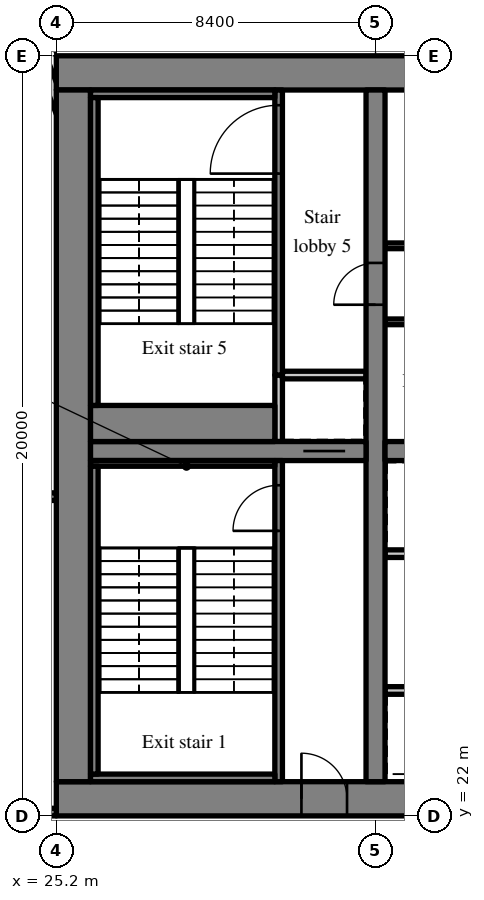
"""IFC4 building model, lengths in metres.
Left out: names, types, materials, properties, quantities, classifications, styles, units other than length and angle.
Written with IfcOpenShell. Run it as: python <this file> out.ifc"""

import sys

from ifc_helpers import new_model, si_unit, direction, frame, frame_2d, origin, place, context, subcontext, project, spatial, rectangle, extrude, source, transform, mapped, element, fill, save


model = new_model("IFC4")
c1 = context("Model", 3, precision=1e-05, world=origin(), true_north=direction((0.0, 1.0)))
c2 = subcontext(c1, "Body", "Model", "MODEL_VIEW")
j1 = project(units=[si_unit("LENGTHUNIT", "METRE"), si_unit("PLANEANGLEUNIT", "RADIAN")], contexts=[c1])
p1 = place(None, origin())
s1 = spatial("IfcSite", under=j1, at=p1, CompositionType="ELEMENT")
p2 = place(p1, origin())
s2 = spatial("IfcBuilding", under=s1, at=p2, CompositionType="ELEMENT")
p3 = place(p2, frame((0.0, 0.0, 86.4)))
s3 = spatial("IfcBuildingStorey", under=s2, at=p3, CompositionType="ELEMENT", Elevation=86.4)
m1 = source(origin(), c2, "Body", "SweptSolid", [
    extrude(rectangle(XDim=50.4, YDim=0.9, at=frame_2d((25.2, 0.0))), origin(), (0.0, 0.0, 1.0), 4.72),
])
p4 = place(p3, frame((25.2, 22.45, 0.0), z_axis=(0.0, 0.0, 1.0), x_axis=(1.0, 0.0, 0.0)))
e1 = element("IfcWall", 1, at=p4, inside=s3, PredefinedType="SHEAR", context=c2, shape_type="MappedRepresentation", body=[
    mapped(m1, transform((0.0, 0.0, 0.0), scale=1.0)),
])
m2 = source(origin(), c2, "Body", "SweptSolid", [
    extrude(rectangle(XDim=1.8, YDim=2.1, at=frame_2d((0.9, 1.05))), frame((0.0, 0.46, 0.0), z_axis=(0.0, -1.0, 0.0), x_axis=(1.0, 0.0, 0.0)), (0.0, 0.0, 1.0), 0.92),
])
p5 = place(p4, frame((15.9, 0.0, 0.0)))
e2 = element("IfcOpeningElement", 2, at=p5, cuts=e1, PredefinedType="OPENING", context=c2, shape_type="MappedRepresentation", body=[
    mapped(m2, transform((0.0, 0.0, 0.0), scale=1.0)),
])
m3 = source(origin(), c2, "Body", "SweptSolid", [
    extrude(rectangle(XDim=1.2, YDim=2.1, at=frame_2d((0.6, 1.05))), frame((0.0, 0.46, 0.0), z_axis=(0.0, -1.0, 0.0), x_axis=(1.0, 0.0, 0.0)), (0.0, 0.0, 1.0), 0.92),
])
p6 = place(p4, frame((26.975, 0.0, 0.0)))
e3 = element("IfcOpeningElement", 3, at=p6, cuts=e1, PredefinedType="OPENING", context=c2, shape_type="MappedRepresentation", body=[
    mapped(m3, transform((0.0, 0.0, 0.0), scale=1.0)),
])
m4 = source(origin(), c2, "Body", "SweptSolid", [
    extrude(rectangle(XDim=0.9, YDim=2.1, at=frame_2d((0.45, 1.05))), frame((0.0, 0.46, 0.0), z_axis=(0.0, -1.0, 0.0), x_axis=(1.0, 0.0, 0.0)), (0.0, 0.0, 1.0), 0.92),
])
p7 = place(p4, frame((34.5, 0.0, 0.0)))
e4 = element("IfcOpeningElement", 4, at=p7, cuts=e1, PredefinedType="OPENING", context=c2, shape_type="MappedRepresentation", body=[
    mapped(m4, transform((0.0, 0.0, 0.0), scale=1.0)),
])
p8 = place(p4, frame((31.5, 0.0, 0.0)))
e5 = element("IfcOpeningElement", 5, at=p8, cuts=e1, PredefinedType="OPENING", context=c2, shape_type="MappedRepresentation", body=[
    mapped(m4, transform((0.0, 0.0, 0.0), scale=1.0)),
])
p9 = place(p4, frame((39.788, 0.0, 0.0)))
e6 = element("IfcOpeningElement", 6, at=p9, cuts=e1, PredefinedType="OPENING", context=c2, shape_type="MappedRepresentation", body=[
    mapped(m4, transform((0.0, 0.0, 0.0), scale=1.0)),
])
p10 = place(p4, frame((36.762, 0.0, 0.0)))
e7 = element("IfcOpeningElement", 7, at=p10, cuts=e1, PredefinedType="OPENING", context=c2, shape_type="MappedRepresentation", body=[
    mapped(m4, transform((0.0, 0.0, 0.0), scale=1.0)),
])
p11 = place(p4, frame((6.45, 0.0, 0.0)))
e8 = element("IfcOpeningElement", 8, at=p11, cuts=e1, PredefinedType="OPENING", context=c2, shape_type="MappedRepresentation", body=[
    mapped(m3, transform((0.0, 0.0, 0.0), scale=1.0)),
])
p12 = place(p4, frame((47.775, 0.0, 0.0)))
e9 = element("IfcOpeningElement", 9, at=p12, cuts=e1, PredefinedType="OPENING", context=c2, shape_type="MappedRepresentation", body=[
    mapped(m3, transform((0.0, 0.0, 0.0), scale=1.0)),
])
p13 = place(p3, frame((25.2, 41.55, 0.0), z_axis=(0.0, 0.0, 1.0), x_axis=(1.0, 0.0, 0.0)))
e10 = element("IfcWall", 10, at=p13, inside=s3, PredefinedType="SHEAR", context=c2, shape_type="MappedRepresentation", body=[
    mapped(m1, transform((0.0, 0.0, 0.0), scale=1.0)),
])
m5 = source(origin(), c2, "Body", "SweptSolid", [
    extrude(rectangle(XDim=18.2, YDim=0.9, at=frame_2d((9.1, 0.0))), origin(), (0.0, 0.0, 1.0), 4.72),
])
p14 = place(p3, frame((25.65, 22.9, 0.0), z_axis=(0.0, 0.0, 1.0), x_axis=(0.0, 1.0, 0.0)))
e11 = element("IfcWall", 11, at=p14, inside=s3, PredefinedType="SHEAR", context=c2, shape_type="MappedRepresentation", body=[
    mapped(m5, transform((0.0, 0.0, 0.0), scale=1.0)),
])
m6 = source(origin(), c2, "Body", "SweptSolid", [
    extrude(rectangle(XDim=18.2, YDim=0.5, at=frame_2d((9.1, 0.0))), origin(), (0.0, 0.0, 1.0), 4.72),
])
p15 = place(p3, frame((33.6, 22.9, 0.0), z_axis=(0.0, 0.0, 1.0), x_axis=(0.0, 1.0, 0.0)))
e12 = element("IfcWall", 12, at=p15, inside=s3, PredefinedType="SHEAR", context=c2, shape_type="MappedRepresentation", body=[
    mapped(m6, transform((0.0, 0.0, 0.0), scale=1.0)),
])
m7 = source(origin(), c2, "Body", "SweptSolid", [
    extrude(rectangle(XDim=1.1, YDim=2.1, at=frame_2d((0.55, 1.05))), frame((0.0, 0.26, 0.0), z_axis=(0.0, -1.0, 0.0), x_axis=(1.0, 0.0, 0.0)), (0.0, 0.0, 1.0), 0.52),
])
p16 = place(p15, frame((12.55, 0.0, 0.0)))
e13 = element("IfcOpeningElement", 13, at=p16, cuts=e12, PredefinedType="OPENING", context=c2, shape_type="MappedRepresentation", body=[
    mapped(m7, transform((0.0, 0.0, 0.0), scale=1.0)),
])
m8 = source(origin(), c2, "Body", "SweptSolid", [
    extrude(rectangle(XDim=7.25, YDim=0.5, at=frame_2d((3.625, 0.0))), origin(), (0.0, 0.0, 1.0), 4.72),
])
p17 = place(p3, frame((26.1, 31.6, 0.0), z_axis=(0.0, 0.0, 1.0), x_axis=(1.0, 0.0, 0.0)))
e14 = element("IfcWall", 14, at=p17, inside=s3, PredefinedType="SHEAR", context=c2, shape_type="MappedRepresentation", body=[
    mapped(m8, transform((0.0, 0.0, 0.0), scale=1.0)),
])
p18 = place(p17, frame((5.6, 0.0, 0.0)))
e15 = element("IfcOpeningElement", 15, at=p18, cuts=e14, PredefinedType="OPENING", context=c2, shape_type="MappedRepresentation", body=[
    mapped(m7, transform((0.0, 0.0, 0.0), scale=1.0)),
])
m9 = source(origin(), c2, "Body", "SweptSolid", [
    extrude(rectangle(XDim=16.3, YDim=0.5, at=frame_2d((8.15, 0.0))), origin(), (0.0, 0.0, 1.0), 4.72),
])
p19 = place(p3, frame((33.85, 31.6, 0.0), z_axis=(0.0, 0.0, 1.0), x_axis=(1.0, 0.0, 0.0)))
e16 = element("IfcWall", 16, at=p19, inside=s3, PredefinedType="SHEAR", context=c2, shape_type="MappedRepresentation", body=[
    mapped(m9, transform((0.0, 0.0, 0.0), scale=1.0)),
])
m10 = source(origin(), c2, "Body", "SweptSolid", [
    extrude(rectangle(XDim=1.0, YDim=2.1, at=frame_2d((0.5, 1.05))), frame((0.0, 0.26, 0.0), z_axis=(0.0, -1.0, 0.0), x_axis=(1.0, 0.0, 0.0)), (0.0, 0.0, 1.0), 0.52),
])
p20 = place(p19, frame((14.725, 0.0, 0.0)))
e17 = element("IfcOpeningElement", 17, at=p20, cuts=e16, PredefinedType="OPENING", context=c2, shape_type="MappedRepresentation", body=[
    mapped(m10, transform((0.0, 0.0, 0.0), scale=1.0)),
])
m11 = source(origin(), c2, "Body", "SweptSolid", [
    extrude(rectangle(XDim=3.559, YDim=0.3, at=frame_2d((1.78, 0.0))), origin(), (0.0, 0.0, 1.0), 4.72),
])
p21 = place(p3, frame((25.55, 39.969, 0.0), z_axis=(0.0, 0.0, 1.0), x_axis=(-0.35779745313, 0.933799219604, 0.0)))
e18 = element("IfcWall", 18, at=p21, inside=s3, PredefinedType="SOLIDWALL", context=c2, shape_type="MappedRepresentation", body=[
    mapped(m11, transform((0.0, 0.0, 0.0), scale=1.0)),
])
m12 = source(origin(), c2, "Body", "SweptSolid", [
    extrude(rectangle(XDim=1.5, YDim=2.0, at=frame_2d((0.75, 1.0))), frame((0.0, 0.16, 0.0), z_axis=(0.0, -1.0, 0.0), x_axis=(1.0, 0.0, 0.0)), (0.0, 0.0, 1.0), 0.32),
])
p22 = place(p21, frame((1.903, 0.0, 0.9)))
e19 = element("IfcOpeningElement", 19, at=p22, cuts=e18, PredefinedType="OPENING", context=c2, shape_type="MappedRepresentation", body=[
    mapped(m12, transform((0.0, 0.0, 0.0), scale=1.0)),
])
m13 = source(origin(), c2, "Body", "SweptSolid", [
    extrude(rectangle(XDim=6.05, YDim=0.2, at=frame_2d((3.025, 0.0))), origin(), (0.0, 0.0, 1.0), 4.72),
])
p23 = place(p3, frame((33.85, 25.3, 0.0), z_axis=(0.0, 0.0, 1.0), x_axis=(1.0, 0.0, 0.0)))
e20 = element("IfcWall", 20, at=p23, inside=s3, PredefinedType="SOLIDWALL", context=c2, shape_type="MappedRepresentation", body=[
    mapped(m13, transform((0.0, 0.0, 0.0), scale=1.0)),
])
m14 = source(origin(), c2, "Body", "SweptSolid", [
    extrude(rectangle(XDim=1.1, YDim=2.1, at=frame_2d((0.55, 1.05))), frame((0.0, 0.11, 0.0), z_axis=(0.0, -1.0, 0.0), x_axis=(1.0, 0.0, 0.0)), (0.0, 0.0, 1.0), 0.22),
])
p24 = place(p23, frame((1.0, 0.0, 0.0)))
e21 = element("IfcOpeningElement", 21, at=p24, cuts=e20, PredefinedType="OPENING", context=c2, shape_type="MappedRepresentation", body=[
    mapped(m14, transform((0.0, 0.0, 0.0), scale=1.0)),
])
p25 = place(p23, frame((4.0, 0.0, 0.0)))
e22 = element("IfcOpeningElement", 22, at=p25, cuts=e20, PredefinedType="OPENING", context=c2, shape_type="MappedRepresentation", body=[
    mapped(m14, transform((0.0, 0.0, 0.0), scale=1.0)),
])
m15 = source(origin(), c2, "Body", "SweptSolid", [
    extrude(rectangle(XDim=12.05, YDim=0.2, at=frame_2d((6.025, 0.0))), origin(), (0.0, 0.0, 1.0), 4.72),
])
p26 = place(p3, frame((33.85, 28.9, 0.0), z_axis=(0.0, 0.0, 1.0), x_axis=(1.0, 0.0, 0.0)))
e23 = element("IfcWall", 23, at=p26, inside=s3, PredefinedType="SOLIDWALL", context=c2, shape_type="MappedRepresentation", body=[
    mapped(m15, transform((0.0, 0.0, 0.0), scale=1.0)),
])
p27 = place(p26, frame((1.0, 0.0, 0.0)))
e24 = element("IfcOpeningElement", 24, at=p27, cuts=e23, PredefinedType="OPENING", context=c2, shape_type="MappedRepresentation", body=[
    mapped(m14, transform((0.0, 0.0, 0.0), scale=1.0)),
])
p28 = place(p26, frame((4.0, 0.0, 0.0)))
e25 = element("IfcOpeningElement", 25, at=p28, cuts=e23, PredefinedType="OPENING", context=c2, shape_type="MappedRepresentation", body=[
    mapped(m14, transform((0.0, 0.0, 0.0), scale=1.0)),
])
p29 = place(p26, frame((7.0, 0.0, 0.0)))
e26 = element("IfcOpeningElement", 26, at=p29, cuts=e23, PredefinedType="OPENING", context=c2, shape_type="MappedRepresentation", body=[
    mapped(m14, transform((0.0, 0.0, 0.0), scale=1.0)),
])
p30 = place(p26, frame((10.0, 0.0, 0.0)))
e27 = element("IfcOpeningElement", 27, at=p30, cuts=e23, PredefinedType="OPENING", context=c2, shape_type="MappedRepresentation", body=[
    mapped(m14, transform((0.0, 0.0, 0.0), scale=1.0)),
])
m16 = source(origin(), c2, "Body", "SweptSolid", [
    extrude(rectangle(XDim=14.15, YDim=0.15, at=frame_2d((7.075, 0.0))), origin(), (0.0, 0.0, 1.0), 4.72),
])
p31 = place(p3, frame((33.85, 35.0, 0.0), z_axis=(0.0, 0.0, 1.0), x_axis=(1.0, 0.0, 0.0)))
e28 = element("IfcWall", 28, at=p31, inside=s3, PredefinedType="PARTITIONING", context=c2, shape_type="MappedRepresentation", body=[
    mapped(m16, transform((0.0, 0.0, 0.0), scale=1.0)),
])
m17 = source(origin(), c2, "Body", "SweptSolid", [
    extrude(rectangle(XDim=0.9, YDim=2.1, at=frame_2d((0.45, 1.05))), frame((0.0, 0.085, 0.0), z_axis=(0.0, -1.0, 0.0), x_axis=(1.0, 0.0, 0.0)), (0.0, 0.0, 1.0), 0.17),
])
p32 = place(p31, frame((2.013, 0.0, 0.0)))
e29 = element("IfcOpeningElement", 29, at=p32, cuts=e28, PredefinedType="OPENING", context=c2, shape_type="MappedRepresentation", body=[
    mapped(m17, transform((0.0, 0.0, 0.0), scale=1.0)),
])
p33 = place(p31, frame((9.051, 0.0, 0.0)))
e30 = element("IfcOpeningElement", 30, at=p33, cuts=e28, PredefinedType="OPENING", context=c2, shape_type="MappedRepresentation", body=[
    mapped(m17, transform((0.0, 0.0, 0.0), scale=1.0)),
])
m18 = source(origin(), c2, "Body", "SweptSolid", [
    extrude(rectangle(XDim=16.3, YDim=0.15, at=frame_2d((8.15, 0.0))), origin(), (0.0, 0.0, 1.0), 4.72),
])
p34 = place(p3, frame((33.85, 37.0, 0.0), z_axis=(0.0, 0.0, 1.0), x_axis=(1.0, 0.0, 0.0)))
e31 = element("IfcWall", 31, at=p34, inside=s3, PredefinedType="PARTITIONING", context=c2, shape_type="MappedRepresentation", body=[
    mapped(m18, transform((0.0, 0.0, 0.0), scale=1.0)),
])
p35 = place(p34, frame((3.217, 0.0, 0.0)))
e32 = element("IfcOpeningElement", 32, at=p35, cuts=e31, PredefinedType="OPENING", context=c2, shape_type="MappedRepresentation", body=[
    mapped(m17, transform((0.0, 0.0, 0.0), scale=1.0)),
])
p36 = place(p34, frame((8.107, 0.0, 0.0)))
e33 = element("IfcOpeningElement", 33, at=p36, cuts=e31, PredefinedType="OPENING", context=c2, shape_type="MappedRepresentation", body=[
    mapped(m17, transform((0.0, 0.0, 0.0), scale=1.0)),
])
p37 = place(p34, frame((11.368, 0.0, 0.0)))
e34 = element("IfcOpeningElement", 34, at=p37, cuts=e31, PredefinedType="OPENING", context=c2, shape_type="MappedRepresentation", body=[
    mapped(m17, transform((0.0, 0.0, 0.0), scale=1.0)),
])
p38 = place(p34, frame((14.627, 0.0, 0.0)))
e35 = element("IfcOpeningElement", 35, at=p38, cuts=e31, PredefinedType="OPENING", context=c2, shape_type="MappedRepresentation", body=[
    mapped(m17, transform((0.0, 0.0, 0.0), scale=1.0)),
])
m19 = source(origin(), c2, "Body", "SweptSolid", [
    extrude(rectangle(XDim=8.45, YDim=0.2, at=frame_2d((4.225, 0.0))), origin(), (0.0, 0.0, 1.0), 4.72),
])
p39 = place(p3, frame((31.05, 22.9, 0.0), z_axis=(0.0, 0.0, 1.0), x_axis=(0.0, 1.0, 0.0)))
e36 = element("IfcWall", 36, at=p39, inside=s3, PredefinedType="SOLIDWALL", context=c2, shape_type="MappedRepresentation", body=[
    mapped(m19, transform((0.0, 0.0, 0.0), scale=1.0)),
])
m20 = source(origin(), c2, "Body", "SweptSolid", [
    extrude(rectangle(XDim=1.2, YDim=2.1, at=frame_2d((0.6, 1.05))), frame((0.0, 0.11, 0.0), z_axis=(0.0, -1.0, 0.0), x_axis=(1.0, 0.0, 0.0)), (0.0, 0.0, 1.0), 0.22),
])
p40 = place(p39, frame((6.6, 0.0, 0.0)))
e37 = element("IfcOpeningElement", 37, at=p40, cuts=e36, PredefinedType="OPENING", context=c2, shape_type="MappedRepresentation", body=[
    mapped(m20, transform((0.0, 0.0, 0.0), scale=1.0)),
])
m21 = source(origin(), c2, "Body", "SweptSolid", [
    extrude(rectangle(XDim=1.75, YDim=0.2, at=frame_2d((0.875, 0.0))), origin(), (0.0, 0.0, 1.0), 4.72),
])
p41 = place(p3, frame((31.05, 31.85, 0.0), z_axis=(0.0, 0.0, 1.0), x_axis=(0.0, 1.0, 0.0)))
e38 = element("IfcWall", 38, at=p41, inside=s3, PredefinedType="SOLIDWALL", context=c2, shape_type="MappedRepresentation", body=[
    mapped(m21, transform((0.0, 0.0, 0.0), scale=1.0)),
])
m22 = source(origin(), c2, "Body", "SweptSolid", [
    extrude(rectangle(XDim=2.2, YDim=0.2, at=frame_2d((1.1, 0.0))), origin(), (0.0, 0.0, 1.0), 4.72),
])
p42 = place(p3, frame((31.15, 33.6, 0.0), z_axis=(0.0, 0.0, 1.0), x_axis=(1.0, 0.0, 0.0)))
e39 = element("IfcWall", 39, at=p42, inside=s3, PredefinedType="SOLIDWALL", context=c2, shape_type="MappedRepresentation", body=[
    mapped(m22, transform((0.0, 0.0, 0.0), scale=1.0)),
])
m23 = source(origin(), c2, "Body", "SweptSolid", [
    extrude(rectangle(XDim=7.5, YDim=0.2, at=frame_2d((3.75, 0.0))), origin(), (0.0, 0.0, 1.0), 4.72),
])
p43 = place(p3, frame((31.05, 33.6, 0.0), z_axis=(0.0, 0.0, 1.0), x_axis=(0.0, 1.0, 0.0)))
e40 = element("IfcWall", 40, at=p43, inside=s3, PredefinedType="SOLIDWALL", context=c2, shape_type="MappedRepresentation", body=[
    mapped(m23, transform((0.0, 0.0, 0.0), scale=1.0)),
])
m24 = source(origin(), c2, "Body", "SweptSolid", [
    extrude(rectangle(XDim=1.8, YDim=2.1, at=frame_2d((0.9, 1.05))), frame((0.0, 0.11, 0.0), z_axis=(0.0, -1.0, 0.0), x_axis=(1.0, 0.0, 0.0)), (0.0, 0.0, 1.0), 0.22),
])
p44 = place(p43, frame((5.3, 0.0, 0.0)))
e41 = element("IfcOpeningElement", 41, at=p44, cuts=e40, PredefinedType="OPENING", context=c2, shape_type="MappedRepresentation", body=[
    mapped(m24, transform((0.0, 0.0, 0.0), scale=1.0)),
])
m25 = source(origin(), c2, "Body", "SweptSolid", [
    extrude(rectangle(XDim=8.225, YDim=0.2, at=frame_2d((4.112, 0.0))), origin(), (0.0, 0.0, 1.0), 4.72),
])
p45 = place(p3, frame((16.975, 22.1, 0.0), z_axis=(0.0, 0.0, 1.0), x_axis=(1.0, 0.0, 0.0)))
e42 = element("IfcWall", 42, at=p45, inside=s3, PredefinedType="SOLIDWALL", context=c2, shape_type="MappedRepresentation", body=[
    mapped(m25, transform((0.0, 0.0, 0.0), scale=1.0)),
])
p46 = place(p45, frame((6.025, 0.0, 0.0)))
e43 = element("IfcOpeningElement", 43, at=p46, cuts=e42, PredefinedType="OPENING", context=c2, shape_type="MappedRepresentation", body=[
    mapped(m20, transform((0.0, 0.0, 0.0), scale=1.0)),
])
p47 = place(p3, frame((16.975, 30.4, 0.0), z_axis=(0.0, 0.0, 1.0), x_axis=(1.0, 0.0, 0.0)))
e44 = element("IfcWall", 44, at=p47, inside=s3, PredefinedType="SOLIDWALL", context=c2, shape_type="MappedRepresentation", body=[
    mapped(m25, transform((0.0, 0.0, 0.0), scale=1.0)),
])
m26 = source(origin(), c2, "Body", "SweptSolid", [
    extrude(rectangle(XDim=1.0, YDim=2.1, at=frame_2d((0.5, 1.05))), frame((0.0, 0.11, 0.0), z_axis=(0.0, -1.0, 0.0), x_axis=(1.0, 0.0, 0.0)), (0.0, 0.0, 1.0), 0.22),
])
p48 = place(p47, frame((6.125, 0.0, 0.0)))
e45 = element("IfcOpeningElement", 45, at=p48, cuts=e44, PredefinedType="OPENING", context=c2, shape_type="MappedRepresentation", body=[
    mapped(m26, transform((0.0, 0.0, 0.0), scale=1.0)),
])
m27 = source(origin(), c2, "Body", "SweptSolid", [
    extrude(rectangle(XDim=4.85, YDim=0.2, at=frame_2d((2.425, 0.0))), origin(), (0.0, 0.0, 1.0), 4.72),
])
p49 = place(p3, frame((26.1, 23.0, 0.0), z_axis=(0.0, 0.0, 1.0), x_axis=(1.0, 0.0, 0.0)))
e46 = element("IfcWall", 46, at=p49, inside=s3, PredefinedType="SOLIDWALL", context=c2, shape_type="MappedRepresentation", body=[
    mapped(m27, transform((0.0, 0.0, 0.0), scale=1.0)),
])
m28 = source(origin(), c2, "Body", "SweptSolid", [
    extrude(rectangle(XDim=4.85, YDim=0.15, at=frame_2d((2.425, 0.0))), origin(), (0.0, 0.0, 1.0), 4.72),
])
p50 = place(p3, frame((26.1, 31.275, 0.0), z_axis=(0.0, 0.0, 1.0), x_axis=(1.0, 0.0, 0.0)))
e47 = element("IfcWall", 47, at=p50, inside=s3, PredefinedType="SOLIDWALL", context=c2, shape_type="MappedRepresentation", body=[
    mapped(m28, transform((0.0, 0.0, 0.0), scale=1.0)),
])
m29 = source(origin(), c2, "Body", "SweptSolid", [
    extrude(rectangle(XDim=8.1, YDim=0.2, at=frame_2d((4.05, 0.0))), origin(), (0.0, 0.0, 1.0), 4.72),
])
p51 = place(p3, frame((26.2, 23.1, 0.0), z_axis=(0.0, 0.0, 1.0), x_axis=(0.0, 1.0, 0.0)))
e48 = element("IfcWall", 48, at=p51, inside=s3, PredefinedType="SOLIDWALL", context=c2, shape_type="MappedRepresentation", body=[
    mapped(m29, transform((0.0, 0.0, 0.0), scale=1.0)),
])
p52 = place(p3, frame((26.1, 41.0, 0.0), z_axis=(0.0, 0.0, 1.0), x_axis=(1.0, 0.0, 0.0)))
e49 = element("IfcWall", 49, at=p52, inside=s3, PredefinedType="SOLIDWALL", context=c2, shape_type="MappedRepresentation", body=[
    mapped(m27, transform((0.0, 0.0, 0.0), scale=1.0)),
])
m30 = source(origin(), c2, "Body", "SweptSolid", [
    extrude(rectangle(XDim=4.85, YDim=0.95, at=frame_2d((2.425, 0.0))), origin(), (0.0, 0.0, 1.0), 4.72),
])
p53 = place(p3, frame((26.1, 32.325, 0.0), z_axis=(0.0, 0.0, 1.0), x_axis=(1.0, 0.0, 0.0)))
e50 = element("IfcWall", 50, at=p53, inside=s3, PredefinedType="SOLIDWALL", context=c2, shape_type="MappedRepresentation", body=[
    mapped(m30, transform((0.0, 0.0, 0.0), scale=1.0)),
])
p54 = place(p3, frame((26.2, 32.8, 0.0), z_axis=(0.0, 0.0, 1.0), x_axis=(0.0, 1.0, 0.0)))
e51 = element("IfcWall", 51, at=p54, inside=s3, PredefinedType="SOLIDWALL", context=c2, shape_type="MappedRepresentation", body=[
    mapped(m29, transform((0.0, 0.0, 0.0), scale=1.0)),
])
m31 = source(origin(), c2, "Body", "SweptSolid", [
    extrude(rectangle(XDim=1.2, YDim=2.1, at=frame_2d((0.6, 1.05))), frame((0.0, 0.025, 0.0), z_axis=(0.0, -1.0, 0.0), x_axis=(1.0, 0.0, 0.0)), (0.0, 0.0, 1.0), 0.05),
])
p55 = place(p40, origin())
e52 = element("IfcDoor", 52, at=p55, inside=s3, OperationType="SINGLE_SWING_LEFT", PredefinedType="DOOR", context=c2, shape_type="MappedRepresentation", body=[
    mapped(m31, transform((0.0, 0.0, 0.0), scale=1.0)),
])
fill(e37, e52)
m32 = source(origin(), c2, "Body", "SweptSolid", [
    extrude(rectangle(XDim=1.2, YDim=2.1, at=frame_2d((0.6, 1.05))), frame((0.0, 0.375, 0.0), z_axis=(0.0, -1.0, 0.0), x_axis=(1.0, 0.0, 0.0)), (0.0, 0.0, 1.0), 0.05),
])
p56 = place(p11, origin())
e53 = element("IfcDoor", 53, at=p56, inside=s3, OperationType="SINGLE_SWING_LEFT", PredefinedType="DOOR", context=c2, shape_type="MappedRepresentation", body=[
    mapped(m32, transform((0.0, 0.0, 0.0), scale=1.0)),
])
fill(e8, e53)
m33 = source(origin(), c2, "Body", "SweptSolid", [
    extrude(rectangle(XDim=1.1, YDim=2.1, at=frame_2d((0.55, 1.05))), frame((0.0, 0.025, 0.0), z_axis=(0.0, -1.0, 0.0), x_axis=(1.0, 0.0, 0.0)), (0.0, 0.0, 1.0), 0.05),
])
p57 = place(p18, origin())
e54 = element("IfcDoor", 54, at=p57, inside=s3, OperationType="SLIDING_TO_RIGHT", PredefinedType="DOOR", context=c2, shape_type="MappedRepresentation", body=[
    mapped(m33, transform((0.0, 0.0, 0.0), scale=1.0)),
])
fill(e15, e54)
m34 = source(origin(), c2, "Body", "SweptSolid", [
    extrude(rectangle(XDim=1.8, YDim=2.1, at=frame_2d((0.9, 1.05))), frame((0.0, 0.025, 0.0), z_axis=(0.0, -1.0, 0.0), x_axis=(1.0, 0.0, 0.0)), (0.0, 0.0, 1.0), 0.05),
])
p58 = place(p44, origin())
e55 = element("IfcDoor", 55, at=p58, inside=s3, OperationType="SINGLE_SWING_LEFT", PredefinedType="DOOR", context=c2, shape_type="MappedRepresentation", body=[
    mapped(m34, transform((0.0, 0.0, 0.0), scale=1.0)),
])
fill(e41, e55)
p59 = place(p16, origin())
e56 = element("IfcDoor", 56, at=p59, inside=s3, OperationType="SINGLE_SWING_LEFT", PredefinedType="DOOR", context=c2, shape_type="MappedRepresentation", body=[
    mapped(m33, transform((0.0, 0.0, 0.0), scale=1.0)),
])
fill(e13, e56)
save(model, sys.argv[1])
